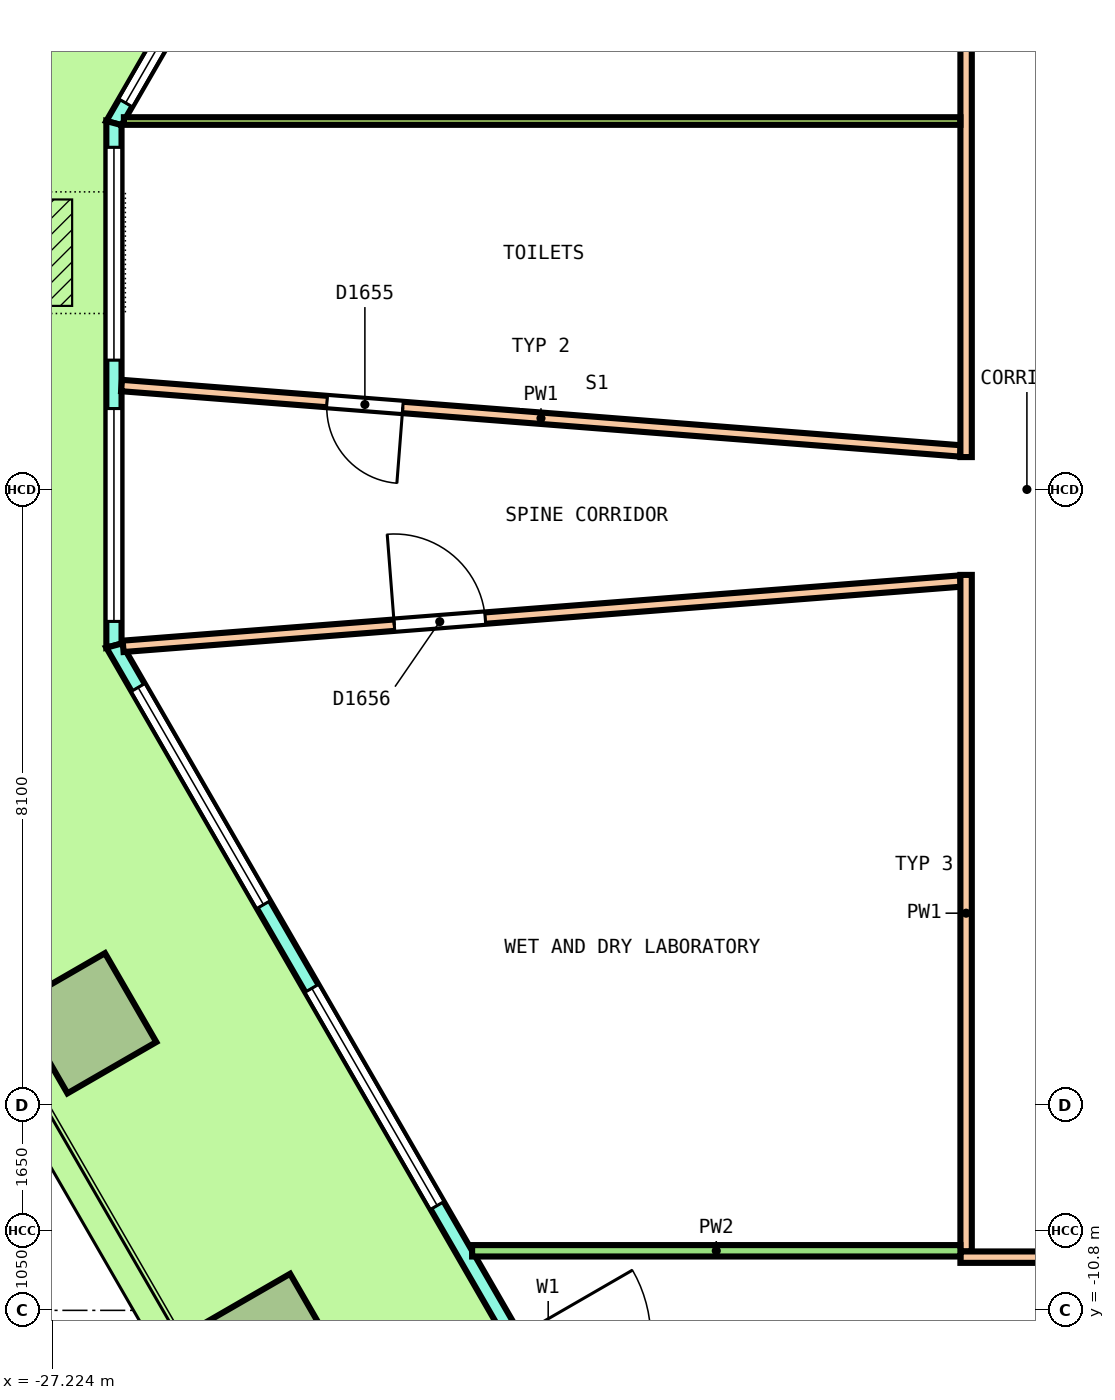
"""IFC4 building model, lengths in metres.
Left out: names, types, materials, properties, quantities, classifications, styles, units other than length and angle.
Written with IfcOpenShell. Run it as: python <this file> out.ifc"""

import sys

from ifc_helpers import new_model, si_unit, direction, frame, frame_2d, origin, origin_2d, place, context, subcontext, project, spatial, polyline, rectangle, outline, extrude, element, fill, save


model = new_model("IFC4")
c1 = context("Model", 3, precision=1e-05, world=origin(), true_north=direction((0.0, 1.0)))
c2 = subcontext(c1, "Body", "Model", "MODEL_VIEW")
j1 = project(units=[si_unit("LENGTHUNIT", "METRE"), si_unit("PLANEANGLEUNIT", "RADIAN")], contexts=[c1])
p1 = place(None, origin())
s1 = spatial("IfcSite", under=j1, at=p1, CompositionType="ELEMENT")
p2 = place(p1, origin())
s2 = spatial("IfcBuilding", under=s1, at=p2, CompositionType="ELEMENT")
p3 = place(p2, frame((0.0, 0.0, 126.4)))
s3 = spatial("IfcBuildingStorey", under=s2, at=p3, CompositionType="ELEMENT", Elevation=126.4)
for number, where, z_axis, x_axis in (
    (1, (-26.776, -7.023, 0.0), (0.0, 0.0, 1.0), (0.5, -0.866, 0.0)),
    (2, (-24.341, -11.241, 0.0), (0.0, 0.0, 1.0), (0.5, -0.866, 0.0)),
):
    element("IfcColumn", number, at=place(p3, frame(where, z_axis=z_axis, x_axis=x_axis)), inside=s3, PredefinedType="COLUMN", context=c2, shape_type="SweptSolid", body=[
        extrude(rectangle(XDim=1.35, YDim=1.35, at=origin_2d()), origin(), (0.0, 0.0, 1.0), 4.05),
    ])
p4 = place(p3, frame((-17.38, 20.463, 0.0), z_axis=(0.0, 0.0, 1.0), x_axis=(-0.500000137386, -0.866025324465, 0.0)))
e3 = element("IfcWall", 3, at=p4, inside=s3, PredefinedType="SOLIDWALL", context=c2, shape_type="SweptSolid", body=[
    extrude(outline(polyline([(-0.027, -0.1), (0.979, -0.1), (1.986, -0.1), (2.992, -0.1), (3.999, -0.1), (5.005, -0.1), (6.012, -0.1), (7.018, -0.1), (8.025, -0.1), (9.031, -0.1), (10.038, -0.1), (11.044, -0.1), (12.051, -0.1), (13.057, -0.1), (14.063, -0.1), (15.07, -0.1), (16.076, -0.1), (17.083, -0.1), (18.089, -0.1), (18.036, 0.1), (17.035, 0.1), (16.035, 0.1), (15.034, 0.1), (14.034, 0.1), (13.033, 0.1), (12.033, 0.1), (11.032, 0.1), (10.032, 0.1), (9.031, 0.1), (8.031, 0.1), (7.03, 0.1), (6.03, 0.1), (5.029, 0.1), (4.029, 0.1), (3.028, 0.1), (2.028, 0.1), (1.027, 0.1), (0.027, 0.1), (-0.027, -0.1)])), origin(), (0.0, 0.0, 1.0), 4.1),
])
p5 = place(p4, frame((0.306, 0.0, 0.1)))
e4 = element("IfcOpeningElement", 4, at=p5, cuts=e3, PredefinedType="OPENING", context=c2, shape_type="SweptSolid", body=[
    extrude(rectangle(XDim=3.0, YDim=2.9, at=frame_2d((1.5, 1.45))), frame((0.0, 0.11, 0.0), z_axis=(0.0, -1.0, 0.0), x_axis=(1.0, 0.0, 0.0)), (0.0, 0.0, 1.0), 0.22),
])
p6 = place(p4, frame((3.919, 0.0, 0.1)))
e5 = element("IfcOpeningElement", 5, at=p6, cuts=e3, PredefinedType="OPENING", context=c2, shape_type="SweptSolid", body=[
    extrude(rectangle(XDim=3.0, YDim=2.9, at=frame_2d((1.5, 1.45))), frame((0.0, 0.11, 0.0), z_axis=(0.0, -1.0, 0.0), x_axis=(1.0, 0.0, 0.0)), (0.0, 0.0, 1.0), 0.22),
])
p7 = place(p4, frame((8.131, 0.0, 0.0)))
e6 = element("IfcOpeningElement", 6, at=p7, cuts=e3, PredefinedType="OPENING", context=c2, shape_type="SweptSolid", body=[
    extrude(rectangle(XDim=1.8, YDim=2.4, at=frame_2d((0.9, 1.2))), frame((0.0, 0.11, 0.0), z_axis=(0.0, -1.0, 0.0), x_axis=(1.0, 0.0, 0.0)), (0.0, 0.0, 1.0), 0.22),
])
p8 = place(p4, frame((8.131, 0.0, 2.55)))
e7 = element("IfcOpeningElement", 7, at=p8, cuts=e3, PredefinedType="OPENING", context=c2, shape_type="SweptSolid", body=[
    extrude(rectangle(XDim=1.8, YDim=0.45, at=frame_2d((0.9, 0.225))), frame((0.0, 0.11, 0.0), z_axis=(0.0, -1.0, 0.0), x_axis=(1.0, 0.0, 0.0)), (0.0, 0.0, 1.0), 0.22),
])
p9 = place(p4, frame((11.144, 0.0, 0.1)))
e8 = element("IfcOpeningElement", 8, at=p9, cuts=e3, PredefinedType="OPENING", context=c2, shape_type="SweptSolid", body=[
    extrude(rectangle(XDim=3.0, YDim=2.9, at=frame_2d((1.5, 1.45))), frame((0.0, 0.11, 0.0), z_axis=(0.0, -1.0, 0.0), x_axis=(1.0, 0.0, 0.0)), (0.0, 0.0, 1.0), 0.22),
])
p10 = place(p4, frame((14.756, 0.0, 0.1)))
e9 = element("IfcOpeningElement", 9, at=p10, cuts=e3, PredefinedType="OPENING", context=c2, shape_type="SweptSolid", body=[
    extrude(rectangle(XDim=3.0, YDim=2.9, at=frame_2d((1.5, 1.45))), frame((0.0, 0.11, 0.0), z_axis=(0.0, -1.0, 0.0), x_axis=(1.0, 0.0, 0.0)), (0.0, 0.0, 1.0), 0.22),
])
p11 = place(p3, frame((-26.411, 4.82, 0.0), z_axis=(0.0, 0.0, 1.0), x_axis=(0.0, -1.0, 0.0)))
e10 = element("IfcWall", 10, at=p11, inside=s3, PredefinedType="SOLIDWALL", context=c2, shape_type="SweptSolid", body=[
    extrude(outline(polyline([(-0.027, -0.1), (1.128, -0.1), (2.283, -0.1), (3.438, -0.1), (4.592, -0.1), (5.747, -0.1), (6.902, -0.1), (6.848, 0.1), (5.711, 0.1), (4.574, 0.1), (3.438, 0.1), (2.301, 0.1), (1.164, 0.1), (0.027, 0.1), (-0.027, -0.1)])), origin(), (0.0, 0.0, 1.0), 4.1),
])
p12 = place(p11, frame((0.319, 0.0, 0.1)))
e11 = element("IfcOpeningElement", 11, at=p12, cuts=e10, PredefinedType="OPENING", context=c2, shape_type="SweptSolid", body=[
    extrude(rectangle(XDim=2.8, YDim=2.9, at=frame_2d((1.4, 1.45))), frame((0.0, 0.11, 0.0), z_axis=(0.0, -1.0, 0.0), x_axis=(1.0, 0.0, 0.0)), (0.0, 0.0, 1.0), 0.22),
])
p13 = place(p11, frame((3.756, 0.0, 0.1)))
e12 = element("IfcOpeningElement", 12, at=p13, cuts=e10, PredefinedType="OPENING", context=c2, shape_type="SweptSolid", body=[
    extrude(rectangle(XDim=2.8, YDim=2.9, at=frame_2d((1.4, 1.45))), frame((0.0, 0.11, 0.0), z_axis=(0.0, -1.0, 0.0), x_axis=(1.0, 0.0, 0.0)), (0.0, 0.0, 1.0), 0.22),
])
p14 = place(p3, frame((-26.411, -2.055, 0.0), z_axis=(0.0, 0.0, 1.0), x_axis=(0.50000204422, -0.86602422355, 0.0)))
e13 = element("IfcWall", 13, at=p14, inside=s3, PredefinedType="SOLIDWALL", context=c2, shape_type="SweptSolid", body=[
    extrude(outline(polyline([(-0.027, -0.1), (1.014, -0.1), (2.055, -0.1), (3.097, -0.1), (4.138, -0.1), (5.179, -0.1), (6.22, -0.1), (7.261, -0.1), (8.303, -0.1), (9.344, -0.1), (10.385, -0.1), (11.426, -0.1), (12.468, -0.1), (13.509, -0.1), (14.55, -0.1), (15.591, -0.1), (16.632, -0.1), (17.673, -0.1), (18.715, -0.1), (19.756, -0.1), (20.797, -0.1), (21.838, -0.1), (22.879, -0.1), (22.826, 0.1), (21.789, 0.1), (20.753, 0.1), (19.717, 0.1), (18.68, 0.1), (17.644, 0.1), (16.608, 0.1), (15.572, 0.1), (14.535, 0.1), (13.499, 0.1), (12.463, 0.1), (11.426, 0.1), (10.39, 0.1), (9.354, 0.1), (8.317, 0.1), (7.281, 0.1), (6.245, 0.1), (5.208, 0.1), (4.172, 0.1), (3.136, 0.1), (2.099, 0.1), (1.063, 0.1), (0.027, 0.1), (-0.027, -0.1)])), origin(), (0.0, 0.0, 1.0), 4.1),
])
p15 = place(p14, frame((0.635, 0.0, 0.1)))
e14 = element("IfcOpeningElement", 14, at=p15, cuts=e13, PredefinedType="OPENING", context=c2, shape_type="SweptSolid", body=[
    extrude(rectangle(XDim=3.3, YDim=2.9, at=frame_2d((1.65, 1.45))), frame((0.0, 0.11, 0.0), z_axis=(0.0, -1.0, 0.0), x_axis=(1.0, 0.0, 0.0)), (0.0, 0.0, 1.0), 0.22),
])
p16 = place(p14, frame((5.206, 0.0, 0.1)))
e15 = element("IfcOpeningElement", 15, at=p16, cuts=e13, PredefinedType="OPENING", context=c2, shape_type="SweptSolid", body=[
    extrude(rectangle(XDim=3.3, YDim=2.9, at=frame_2d((1.65, 1.45))), frame((0.0, 0.11, 0.0), z_axis=(0.0, -1.0, 0.0), x_axis=(1.0, 0.0, 0.0)), (0.0, 0.0, 1.0), 0.22),
])
p17 = place(p14, frame((10.526, 0.0, 0.0)))
e16 = element("IfcOpeningElement", 16, at=p17, cuts=e13, PredefinedType="OPENING", context=c2, shape_type="SweptSolid", body=[
    extrude(rectangle(XDim=1.8, YDim=2.4, at=frame_2d((0.9, 1.2))), frame((0.0, 0.11, 0.0), z_axis=(0.0, -1.0, 0.0), x_axis=(1.0, 0.0, 0.0)), (0.0, 0.0, 1.0), 0.22),
])
p18 = place(p14, frame((10.526, 0.0, 2.55)))
e17 = element("IfcOpeningElement", 17, at=p18, cuts=e13, PredefinedType="OPENING", context=c2, shape_type="SweptSolid", body=[
    extrude(rectangle(XDim=1.8, YDim=0.45, at=frame_2d((0.9, 0.225))), frame((0.0, 0.11, 0.0), z_axis=(0.0, -1.0, 0.0), x_axis=(1.0, 0.0, 0.0)), (0.0, 0.0, 1.0), 0.22),
])
p19 = place(p14, frame((14.347, 0.0, 0.1)))
e18 = element("IfcOpeningElement", 18, at=p19, cuts=e13, PredefinedType="OPENING", context=c2, shape_type="SweptSolid", body=[
    extrude(rectangle(XDim=3.3, YDim=2.9, at=frame_2d((1.65, 1.45))), frame((0.0, 0.11, 0.0), z_axis=(0.0, -1.0, 0.0), x_axis=(1.0, 0.0, 0.0)), (0.0, 0.0, 1.0), 0.22),
])
p20 = place(p14, frame((18.917, 0.0, 0.1)))
e19 = element("IfcOpeningElement", 19, at=p20, cuts=e13, PredefinedType="OPENING", context=c2, shape_type="SweptSolid", body=[
    extrude(rectangle(XDim=3.3, YDim=2.9, at=frame_2d((1.65, 1.45))), frame((0.0, 0.11, 0.0), z_axis=(0.0, -1.0, 0.0), x_axis=(1.0, 0.0, 0.0)), (0.0, 0.0, 1.0), 0.22),
])
p21 = place(p3, frame((-26.311, 1.367, 0.0), z_axis=(0.0, 0.0, 1.0), x_axis=(0.996973369859, -0.077743808706, 0.0)))
e20 = element("IfcWall", 20, at=p21, inside=s3, PredefinedType="PARTITIONING", context=c2, shape_type="SweptSolid", body=[
    extrude(rectangle(XDim=11.07, YDim=0.15, at=frame_2d((5.535, 0.0))), origin(), (0.0, 0.0, 1.0), 3.05),
])
p22 = place(p21, frame((2.711, 0.0, 0.0)))
e21 = element("IfcOpeningElement", 21, at=p22, cuts=e20, PredefinedType="OPENING", context=c2, shape_type="SweptSolid", body=[
    extrude(rectangle(XDim=1.0, YDim=2.1, at=frame_2d((0.5, 1.05))), frame((0.0, 0.085, 0.0), z_axis=(0.0, -1.0, 0.0), x_axis=(1.0, 0.0, 0.0)), (0.0, 0.0, 1.0), 0.17),
])
p23 = place(p3, frame((-26.29, -2.064, 0.0), z_axis=(0.0, 0.0, 1.0), x_axis=(0.99697229372, 0.077757607695, 0.0)))
e22 = element("IfcWall", 22, at=p23, inside=s3, PredefinedType="PARTITIONING", context=c2, shape_type="SweptSolid", body=[
    extrude(rectangle(XDim=11.049, YDim=0.15, at=frame_2d((5.524, 0.0))), origin(), (0.0, 0.0, 1.0), 3.05),
])
p24 = place(p23, frame((3.578, 0.0, 0.0)))
e23 = element("IfcOpeningElement", 23, at=p24, cuts=e22, PredefinedType="OPENING", context=c2, shape_type="SweptSolid", body=[
    extrude(rectangle(XDim=1.2, YDim=2.1, at=frame_2d((0.6, 1.05))), frame((0.0, 0.085, 0.0), z_axis=(0.0, -1.0, 0.0), x_axis=(1.0, 0.0, 0.0)), (0.0, 0.0, 1.0), 0.17),
])
p25 = place(p3, frame((-15.2, -10.025, 0.0), z_axis=(0.0, 0.0, 1.0), x_axis=(0.0, 1.0, 0.0)))
e24 = element("IfcWall", 24, at=p25, inside=s3, PredefinedType="PARTITIONING", context=c2, shape_type="SweptSolid", body=[
    extrude(rectangle(XDim=8.901, YDim=0.15, at=frame_2d((4.45, 0.0))), origin(), (0.0, 0.0, 1.0), 3.05),
])
p26 = place(p3, frame((-15.2, 0.426, 0.0), z_axis=(0.0, 0.0, 1.0), x_axis=(0.0, 1.0, 0.0)))
e25 = element("IfcWall", 25, at=p26, inside=s3, PredefinedType="PARTITIONING", context=c2, shape_type="SweptSolid", body=[
    extrude(rectangle(XDim=9.624, YDim=0.15, at=frame_2d((4.812, 0.0))), origin(), (0.0, 0.0, 1.0), 3.05),
])
p27 = place(p26, frame((6.951, 0.0, 0.0)))
e26 = element("IfcOpeningElement", 26, at=p27, cuts=e25, PredefinedType="OPENING", context=c2, shape_type="SweptSolid", body=[
    extrude(rectangle(XDim=1.2, YDim=2.1, at=frame_2d((0.6, 1.05))), frame((0.0, 0.085, 0.0), z_axis=(0.0, -1.0, 0.0), x_axis=(1.0, 0.0, 0.0)), (0.0, 0.0, 1.0), 0.17),
])
p28 = place(p3, frame((-15.275, -10.1, 0.0), z_axis=(0.0, 0.0, 1.0), x_axis=(1.0, 0.0, 0.0)))
e27 = element("IfcWall", 27, at=p28, inside=s3, PredefinedType="PARTITIONING", context=c2, shape_type="SweptSolid", body=[
    extrude(rectangle(XDim=30.4, YDim=0.15, at=frame_2d((15.2, 0.0))), origin(), (0.0, 0.0, 1.0), 3.05),
])
p29 = place(p28, frame((1.506, 0.0, 0.0)))
e28 = element("IfcOpeningElement", 28, at=p29, cuts=e27, PredefinedType="OPENING", context=c2, shape_type="SweptSolid", body=[
    extrude(rectangle(XDim=1.0, YDim=2.1, at=frame_2d((0.5, 1.05))), frame((0.0, 0.085, 0.0), z_axis=(0.0, -1.0, 0.0), x_axis=(1.0, 0.0, 0.0)), (0.0, 0.0, 1.0), 0.17),
])
p30 = place(p28, frame((7.84, 0.0, 0.0)))
e29 = element("IfcOpeningElement", 29, at=p30, cuts=e27, PredefinedType="OPENING", context=c2, shape_type="SweptSolid", body=[
    extrude(rectangle(XDim=1.0, YDim=2.1, at=frame_2d((0.5, 1.05))), frame((0.0, 0.085, 0.0), z_axis=(0.0, -1.0, 0.0), x_axis=(1.0, 0.0, 0.0)), (0.0, 0.0, 1.0), 0.17),
])
p31 = place(p28, frame((15.685, 0.0, 0.0)))
e30 = element("IfcOpeningElement", 30, at=p31, cuts=e27, PredefinedType="OPENING", context=c2, shape_type="SweptSolid", body=[
    extrude(rectangle(XDim=1.2, YDim=2.1, at=frame_2d((0.6, 1.05))), frame((0.0, 0.085, 0.0), z_axis=(0.0, -1.0, 0.0), x_axis=(1.0, 0.0, 0.0)), (0.0, 0.0, 1.0), 0.17),
])
p32 = place(p28, frame((23.812, 0.0, 0.0)))
e31 = element("IfcOpeningElement", 31, at=p32, cuts=e27, PredefinedType="OPENING", context=c2, shape_type="SweptSolid", body=[
    extrude(rectangle(XDim=1.2, YDim=2.1, at=frame_2d((0.6, 1.05))), frame((0.0, 0.085, 0.0), z_axis=(0.0, -1.0, 0.0), x_axis=(1.0, 0.0, 0.0)), (0.0, 0.0, 1.0), 0.17),
])
p33 = place(p3, frame((-21.699, -10.016, 0.0), z_axis=(0.0, 0.0, 1.0), x_axis=(1.0, 0.0, 0.0)))
e32 = element("IfcWall", 32, at=p33, inside=s3, PredefinedType="PARTITIONING", context=c2, shape_type="SweptSolid", body=[
    extrude(rectangle(XDim=6.424, YDim=0.15, at=frame_2d((3.212, 0.0))), origin(), (0.0, 0.0, 1.0), 3.05),
])
p34 = place(p3, frame((-26.28, 4.847, 0.0), z_axis=(0.0, 0.0, 1.0), x_axis=(1.0, 0.0, 0.0)))
e33 = element("IfcWall", 33, at=p34, inside=s3, PredefinedType="PARTITIONING", context=c2, shape_type="SweptSolid", body=[
    extrude(rectangle(XDim=11.005, YDim=0.1, at=frame_2d((5.503, 0.0))), origin(), (0.0, 0.0, 1.0), 3.05),
])
p35 = place(p10, origin())
e34 = element("IfcWindow", 34, at=p35, inside=s3, PartitioningType="SINGLE_PANEL", PredefinedType="WINDOW", context=c2, shape_type="SweptSolid", body=[
    extrude(rectangle(XDim=3.0, YDim=2.9, at=frame_2d((1.5, 1.45))), frame((0.0, 0.03, 0.0), z_axis=(0.0, -1.0, 0.0), x_axis=(1.0, 0.0, 0.0)), (0.0, 0.0, 1.0), 0.06),
])
fill(e9, e34)
p36 = place(p12, origin())
e35 = element("IfcWindow", 35, at=p36, inside=s3, PartitioningType="SINGLE_PANEL", PredefinedType="WINDOW", context=c2, shape_type="SweptSolid", body=[
    extrude(rectangle(XDim=2.8, YDim=2.9, at=frame_2d((1.4, 1.45))), frame((0.0, 0.03, 0.0), z_axis=(0.0, -1.0, 0.0), x_axis=(1.0, 0.0, 0.0)), (0.0, 0.0, 1.0), 0.06),
])
fill(e11, e35)
p37 = place(p13, origin())
e36 = element("IfcWindow", 36, at=p37, inside=s3, PartitioningType="SINGLE_PANEL", PredefinedType="WINDOW", context=c2, shape_type="SweptSolid", body=[
    extrude(rectangle(XDim=2.8, YDim=2.9, at=frame_2d((1.4, 1.45))), frame((0.0, 0.03, 0.0), z_axis=(0.0, -1.0, 0.0), x_axis=(1.0, 0.0, 0.0)), (0.0, 0.0, 1.0), 0.06),
])
fill(e12, e36)
p38 = place(p15, origin())
e37 = element("IfcWindow", 37, at=p38, inside=s3, PartitioningType="SINGLE_PANEL", PredefinedType="WINDOW", context=c2, shape_type="SweptSolid", body=[
    extrude(rectangle(XDim=3.3, YDim=2.9, at=frame_2d((1.65, 1.45))), frame((0.0, 0.03, 0.0), z_axis=(0.0, -1.0, 0.0), x_axis=(1.0, 0.0, 0.0)), (0.0, 0.0, 1.0), 0.06),
])
fill(e14, e37)
p39 = place(p16, origin())
e38 = element("IfcWindow", 38, at=p39, inside=s3, PartitioningType="SINGLE_PANEL", PredefinedType="WINDOW", context=c2, shape_type="SweptSolid", body=[
    extrude(rectangle(XDim=3.3, YDim=2.9, at=frame_2d((1.65, 1.45))), frame((0.0, 0.03, 0.0), z_axis=(0.0, -1.0, 0.0), x_axis=(1.0, 0.0, 0.0)), (0.0, 0.0, 1.0), 0.06),
])
fill(e15, e38)
p40 = place(p22, origin())
e39 = element("IfcDoor", 39, at=p40, inside=s3, OperationType="SINGLE_SWING_LEFT", PredefinedType="DOOR", context=c2, shape_type="SweptSolid", body=[
    extrude(rectangle(XDim=1.0, YDim=2.1, at=frame_2d((0.5, 1.05))), frame((0.0, 0.025, 0.0), z_axis=(0.0, -1.0, 0.0), x_axis=(1.0, 0.0, 0.0)), (0.0, 0.0, 1.0), 0.05),
])
fill(e21, e39)
p41 = place(p24, origin())
e40 = element("IfcDoor", 40, at=p41, inside=s3, OperationType="DOUBLE_DOOR_SINGLE_SWING", PredefinedType="DOOR", context=c2, shape_type="SweptSolid", body=[
    extrude(rectangle(XDim=1.2, YDim=2.1, at=frame_2d((0.6, 1.05))), frame((0.0, 0.025, 0.0), z_axis=(0.0, -1.0, 0.0), x_axis=(1.0, 0.0, 0.0)), (0.0, 0.0, 1.0), 0.05),
])
fill(e23, e40)
save(model, sys.argv[1])
